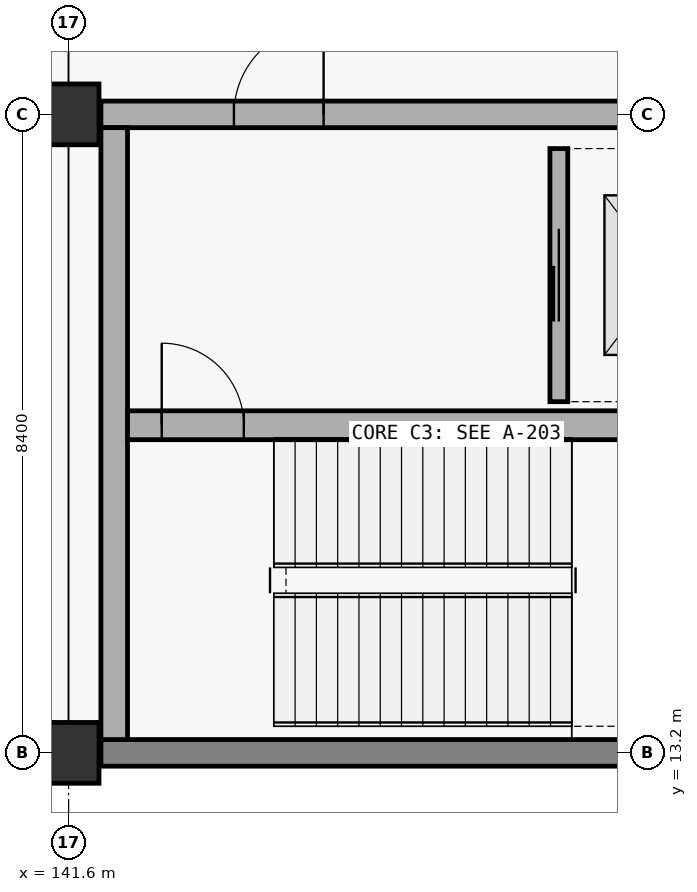
"""IFC4 building model, lengths in metres.
Left out: names, types, materials, properties, quantities, classifications, styles, units other than length and angle.
Written with IfcOpenShell. Run it as: python <this file> out.ifc"""

import sys

from ifc_helpers import new_model, si_unit, direction, frame, frame_2d, origin, origin_2d, place, context, subcontext, project, spatial, rectangle, extrude, element, fill, save


model = new_model("IFC4")
c1 = context("Model", 3, precision=1e-05, world=origin(), true_north=direction((0.0, 1.0)))
c2 = subcontext(c1, "Body", "Model", "MODEL_VIEW")
j1 = project(units=[si_unit("LENGTHUNIT", "METRE"), si_unit("PLANEANGLEUNIT", "RADIAN")], contexts=[c1])
p1 = place(None, origin())
s1 = spatial("IfcSite", under=j1, at=p1, CompositionType="ELEMENT")
p2 = place(p1, origin())
s2 = spatial("IfcBuilding", under=s1, at=p2, CompositionType="ELEMENT")
p3 = place(p2, frame((0.0, 0.0, 10.5)))
s3 = spatial("IfcBuildingStorey", under=s2, at=p3, CompositionType="ELEMENT", Elevation=10.5)
for number, where, z_axis, x_axis in (
    (1, (141.6, 13.2, 0.0), (0.0, 0.0, 1.0), (1.0, 0.0, 0.0)),
    (2, (141.6, 21.6, 0.0), (0.0, 0.0, 1.0), (1.0, 0.0, 0.0)),
):
    element("IfcColumn", number, at=place(p3, frame(where, z_axis=z_axis, x_axis=x_axis)), inside=s3, PredefinedType="COLUMN", context=c2, shape_type="SweptSolid", body=[
        extrude(rectangle(XDim=0.8, YDim=0.8, at=origin_2d()), origin(), (0.0, 0.0, 1.0), 5.1),
    ])
p4 = place(p3, frame((151.375, 13.2, 0.0), z_axis=(0.0, 0.0, 1.0), x_axis=(-1.0, 0.0, 0.0)))
e3 = element("IfcWall", 3, at=p4, inside=s3, PredefinedType="SHEAR", context=c2, shape_type="SweptSolid", body=[
    extrude(rectangle(XDim=9.35, YDim=0.35, at=frame_2d((4.675, 0.0))), origin(), (0.0, 0.0, 1.0), 5.1),
])
p5 = place(p3, frame((142.025, 21.6, 0.0), z_axis=(0.0, 0.0, 1.0), x_axis=(1.0, 0.0, 0.0)))
e4 = element("IfcWall", 4, at=p5, inside=s3, PredefinedType="SHEAR", context=c2, shape_type="SweptSolid", body=[
    extrude(rectangle(XDim=9.35, YDim=0.35, at=frame_2d((4.675, 0.0))), origin(), (0.0, 0.0, 1.0), 5.1),
])
p6 = place(p5, frame((1.75, 0.0, 0.0)))
e5 = element("IfcOpeningElement", 5, at=p6, cuts=e4, PredefinedType="OPENING", context=c2, shape_type="SweptSolid", body=[
    extrude(rectangle(XDim=1.18, YDim=2.24, at=frame_2d((0.59, 1.12))), frame((0.0, 0.185, 0.0), z_axis=(0.0, -1.0, 0.0), x_axis=(1.0, 0.0, 0.0)), (0.0, 0.0, 1.0), 0.37),
])
p7 = place(p3, frame((142.2, 13.375, 0.0), z_axis=(0.0, 0.0, 1.0), x_axis=(0.0, 1.0, 0.0)))
e6 = element("IfcWall", 6, at=p7, inside=s3, PredefinedType="SHEAR", context=c2, shape_type="SweptSolid", body=[
    extrude(rectangle(XDim=8.05, YDim=0.35, at=frame_2d((4.025, 0.0))), origin(), (0.0, 0.0, 1.0), 5.1),
])
p8 = place(p3, frame((142.375, 17.51, 0.0), z_axis=(0.0, 0.0, 1.0), x_axis=(1.0, 0.0, 0.0)))
e7 = element("IfcWall", 7, at=p8, inside=s3, PredefinedType="SHEAR", context=c2, shape_type="SweptSolid", body=[
    extrude(rectangle(XDim=8.65, YDim=0.38, at=frame_2d((4.325, 0.0))), origin(), (0.0, 0.0, 1.0), 5.1),
])
p9 = place(p8, frame((0.45, 0.0, 0.0)))
e8 = element("IfcOpeningElement", 8, at=p9, cuts=e7, PredefinedType="OPENING", context=c2, shape_type="SweptSolid", body=[
    extrude(rectangle(XDim=1.08, YDim=2.18, at=frame_2d((0.54, 1.09))), frame((0.0, 0.2, 0.0), z_axis=(0.0, -1.0, 0.0), x_axis=(1.0, 0.0, 0.0)), (0.0, 0.0, 1.0), 0.4),
])
p10 = place(p3, frame((148.05, 17.82, 0.0), z_axis=(0.0, 0.0, 1.0), x_axis=(0.0, 1.0, 0.0)))
e9 = element("IfcWall", 9, at=p10, inside=s3, PredefinedType="PARTITIONING", context=c2, shape_type="SweptSolid", body=[
    extrude(rectangle(XDim=3.33, YDim=0.235, at=frame_2d((1.665, 0.0))), origin(), (0.0, 0.0, 1.0), 4.72),
])
p11 = place(p10, frame((1.055, 0.0, 0.0)))
e10 = element("IfcOpeningElement", 10, at=p11, cuts=e9, PredefinedType="OPENING", context=c2, shape_type="SweptSolid", body=[
    extrude(rectangle(XDim=1.22, YDim=2.24, at=frame_2d((0.61, 1.12))), frame((0.0, 0.127, 0.0), z_axis=(0.0, -1.0, 0.0), x_axis=(1.0, 0.0, 0.0)), (0.0, 0.0, 1.0), 0.255),
])
p12 = place(p9, origin())
e11 = element("IfcDoor", 11, at=p12, inside=s3, OperationType="SINGLE_SWING_LEFT", PredefinedType="DOOR", context=c2, shape_type="SweptSolid", body=[
    extrude(rectangle(XDim=1.08, YDim=2.18, at=frame_2d((0.54, 1.09))), frame((0.0, 0.025, 0.0), z_axis=(0.0, -1.0, 0.0), x_axis=(1.0, 0.0, 0.0)), (0.0, 0.0, 1.0), 0.05),
])
fill(e8, e11)
p13 = place(p6, origin())
e12 = element("IfcDoor", 12, at=p13, inside=s3, OperationType="SINGLE_SWING_RIGHT", PredefinedType="DOOR", context=c2, shape_type="SweptSolid", body=[
    extrude(rectangle(XDim=1.18, YDim=2.24, at=frame_2d((0.59, 1.12))), frame((0.0, 0.025, 0.0), z_axis=(0.0, -1.0, 0.0), x_axis=(1.0, 0.0, 0.0)), (0.0, 0.0, 1.0), 0.05),
])
fill(e5, e12)
p14 = place(p11, origin())
e13 = element("IfcDoor", 13, at=p14, inside=s3, OperationType="SLIDING_TO_RIGHT", PredefinedType="DOOR", context=c2, shape_type="SweptSolid", body=[
    extrude(rectangle(XDim=1.22, YDim=2.24, at=frame_2d((0.61, 1.12))), frame((0.0, 0.025, 0.0), z_axis=(0.0, -1.0, 0.0), x_axis=(1.0, 0.0, 0.0)), (0.0, 0.0, 1.0), 0.05),
])
fill(e10, e13)
save(model, sys.argv[1])
